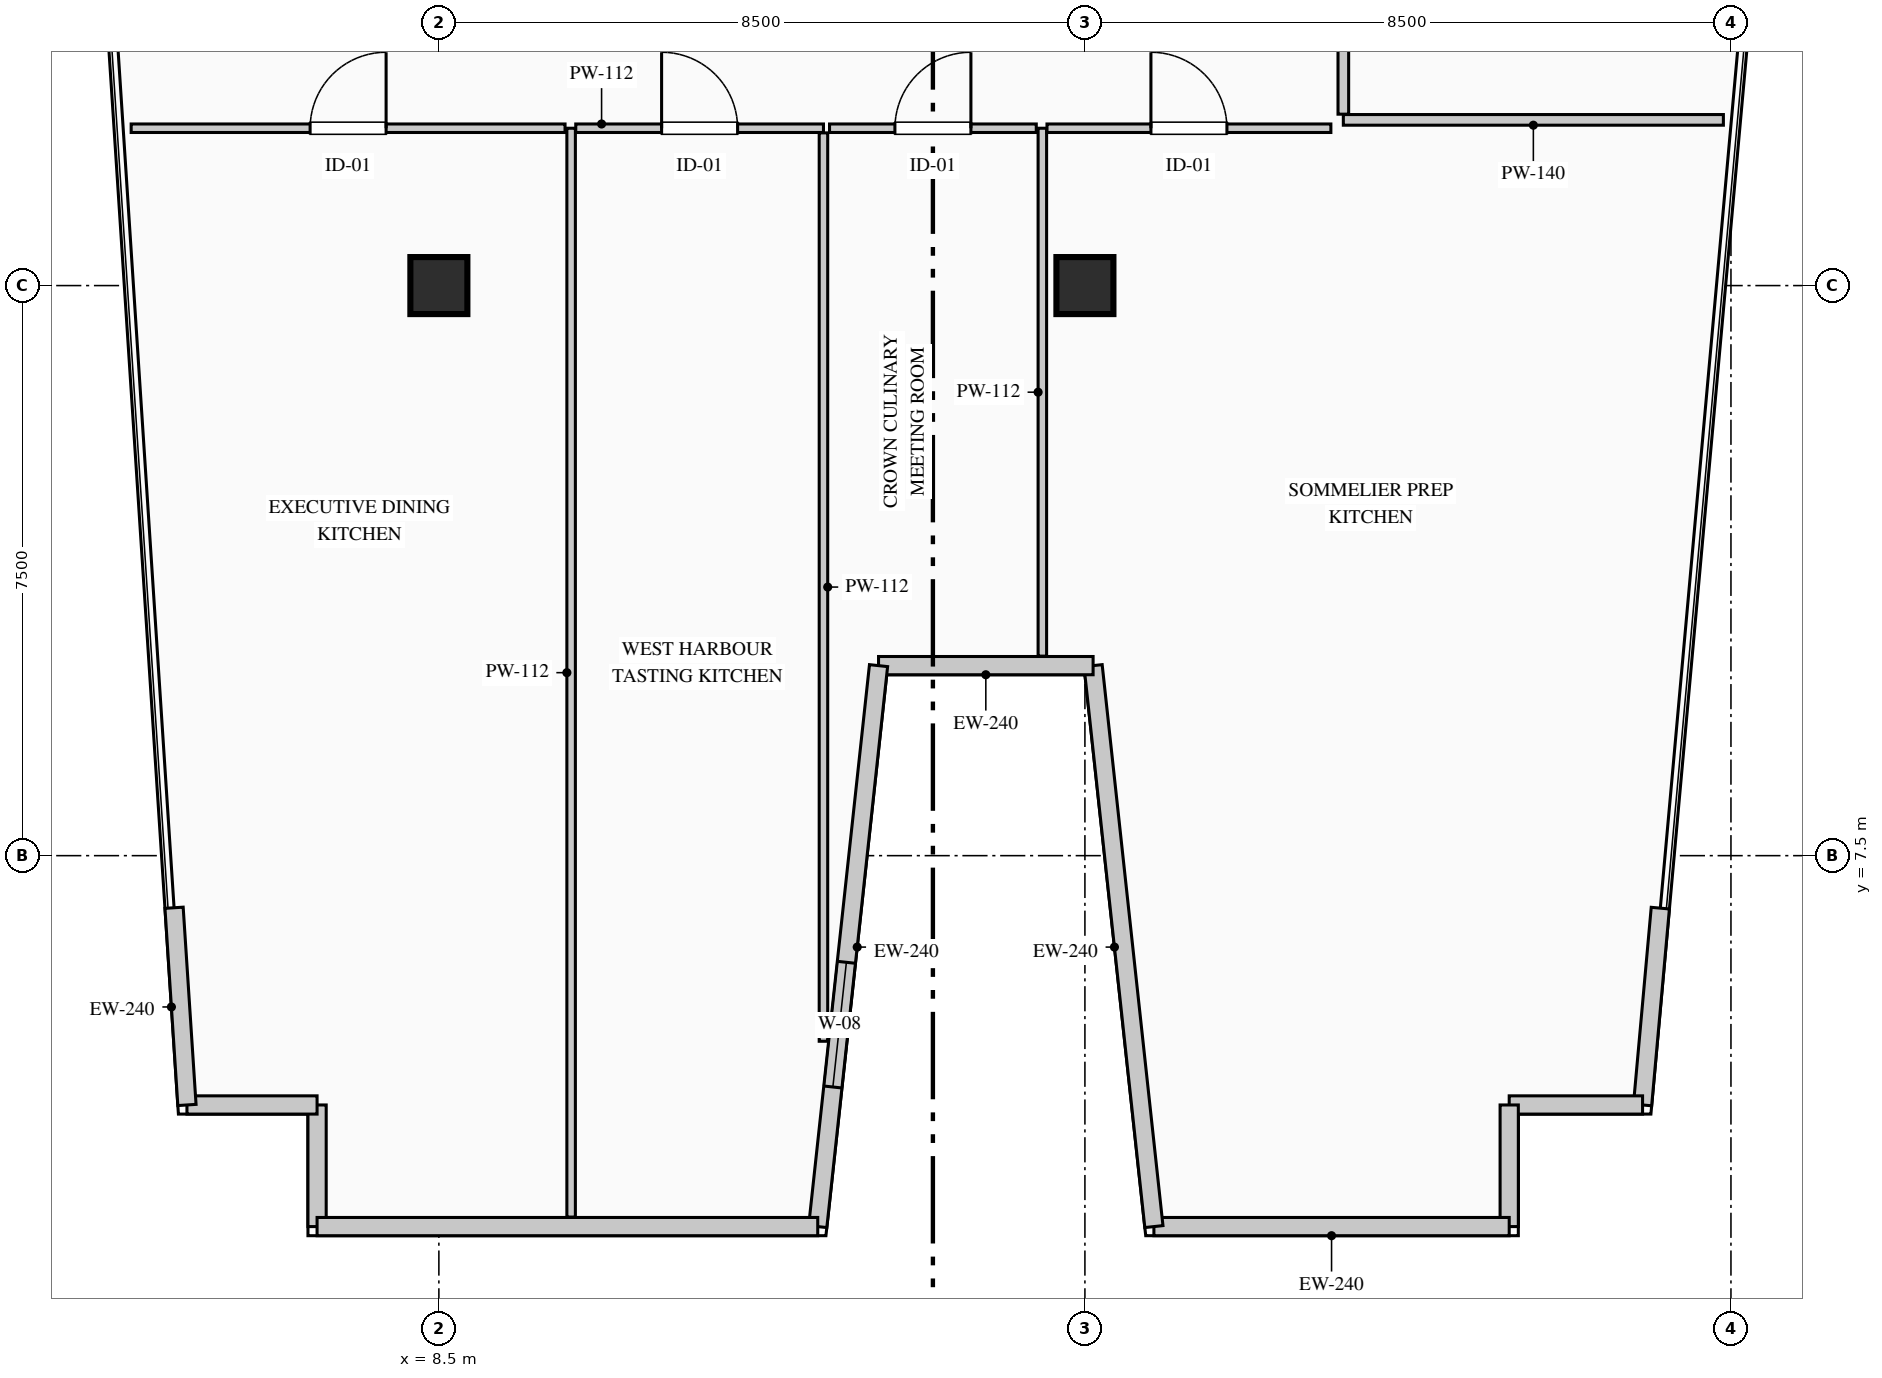
"""IFC4 building model, lengths in metres.
Left out: names, types, materials, properties, quantities, classifications, styles, units other than length and angle.
Written with IfcOpenShell. Run it as: python <this file> out.ifc"""

import sys

from ifc_helpers import new_model, si_unit, direction, frame, frame_2d, origin, origin_2d, place, context, subcontext, project, spatial, rectangle, extrude, element, fill, save


model = new_model("IFC4")
c1 = context("Model", 3, precision=1e-05, world=origin(), true_north=direction((0.0, 1.0)))
c2 = subcontext(c1, "Body", "Model", "MODEL_VIEW")
j1 = project(units=[si_unit("LENGTHUNIT", "METRE"), si_unit("PLANEANGLEUNIT", "RADIAN")], contexts=[c1])
p1 = place(None, origin())
s1 = spatial("IfcSite", under=j1, at=p1, CompositionType="ELEMENT")
p2 = place(p1, origin())
s2 = spatial("IfcBuilding", under=s1, at=p2, CompositionType="ELEMENT")
p3 = place(p2, frame((0.0, 0.0, 304.1)))
s3 = spatial("IfcBuildingStorey", under=s2, at=p3, CompositionType="ELEMENT", Elevation=304.1)
for number, where, z_axis, x_axis in (
    (1, (8.5, 15.0, 0.0), (0.0, 0.0, 1.0), (1.0, 0.0, 0.0)),
    (2, (17.0, 15.0, 0.0), (0.0, 0.0, 1.0), (1.0, 0.0, 0.0)),
):
    element("IfcColumn", number, at=place(p3, frame(where, z_axis=z_axis, x_axis=x_axis)), inside=s3, PredefinedType="COLUMN", context=c2, shape_type="SweptSolid", body=[
        extrude(rectangle(XDim=0.75, YDim=0.75, at=origin_2d()), origin(), (0.0, 0.0, 1.0), 3.95),
    ])
p4 = place(p3, frame((6.897, 2.62, 0.0), z_axis=(0.0, 0.0, 1.0), x_axis=(0.0, 1.0, 0.0)))
e3 = element("IfcWall", 3, at=p4, inside=s3, PredefinedType="STANDARD", context=c2, shape_type="SweptSolid", body=[
    extrude(rectangle(XDim=1.6, YDim=0.24, at=frame_2d((0.8, 0.0))), origin(), (0.0, 0.0, 1.0), 3.7),
])
p5 = place(p3, frame((6.897, 4.22, 0.0), z_axis=(0.0, 0.0, 1.0), x_axis=(-1.0, 0.0, 0.0)))
e4 = element("IfcWall", 4, at=p5, inside=s3, PredefinedType="STANDARD", context=c2, shape_type="SweptSolid", body=[
    extrude(rectangle(XDim=1.712, YDim=0.24, at=frame_2d((0.856, 0.0))), origin(), (0.0, 0.0, 1.0), 3.7),
])
for number, where, z_axis, x_axis in (
    (5, (5.185, 4.22, 0.0), (0.0, 0.0, 1.0), (-0.065, 0.998, 0.0)),
    (6, (24.571, 6.81, 0.0), (0.0, 0.0, 1.0), (-0.09, -0.996, 0.0)),
):
    element("IfcWall", number, at=place(p3, frame(where, z_axis=z_axis, x_axis=x_axis)), inside=s3, PredefinedType="STANDARD", context=c2, shape_type="SweptSolid", body=[
        extrude(rectangle(XDim=2.6, YDim=0.24, at=frame_2d((1.3, 0.0))), origin(), (0.0, 0.0, 1.0), 3.7),
    ])
p6 = place(p3, frame((24.337, 4.22, 0.0), z_axis=(0.0, 0.0, 1.0), x_axis=(-1.0, 0.0, 0.0)))
e7 = element("IfcWall", 7, at=p6, inside=s3, PredefinedType="STANDARD", context=c2, shape_type="SweptSolid", body=[
    extrude(rectangle(XDim=1.755, YDim=0.24, at=frame_2d((0.877, 0.0))), origin(), (0.0, 0.0, 1.0), 3.7),
])
p7 = place(p3, frame((22.583, 4.22, 0.0), z_axis=(0.0, 0.0, 1.0), x_axis=(0.0, -1.0, 0.0)))
e8 = element("IfcWall", 8, at=p7, inside=s3, PredefinedType="STANDARD", context=c2, shape_type="SweptSolid", body=[
    extrude(rectangle(XDim=1.6, YDim=0.24, at=frame_2d((0.8, 0.0))), origin(), (0.0, 0.0, 1.0), 3.7),
])
p8 = place(p3, frame((22.583, 2.62, 0.0), z_axis=(0.0, 0.0, 1.0), x_axis=(-1.0, 0.0, 0.0)))
e9 = element("IfcWall", 9, at=p8, inside=s3, PredefinedType="STANDARD", context=c2, shape_type="SweptSolid", body=[
    extrude(rectangle(XDim=4.675, YDim=0.24, at=frame_2d((2.337, 0.0))), origin(), (0.0, 0.0, 1.0), 3.7),
])
p9 = place(p3, frame((17.908, 2.62, 0.0), z_axis=(0.0, 0.0, 1.0), x_axis=(-0.107777936076, 0.994174992894, 0.0)))
e10 = element("IfcWall", 10, at=p9, inside=s3, PredefinedType="STANDARD", context=c2, shape_type="SweptSolid", body=[
    extrude(rectangle(XDim=7.423, YDim=0.24, at=frame_2d((3.711, 0.0))), origin(), (0.0, 0.0, 1.0), 3.7),
])
p10 = place(p3, frame((17.108, 10.0, 0.0), z_axis=(0.0, 0.0, 1.0), x_axis=(-1.0, 0.0, 0.0)))
e11 = element("IfcWall", 11, at=p10, inside=s3, PredefinedType="STANDARD", context=c2, shape_type="SweptSolid", body=[
    extrude(rectangle(XDim=2.823, YDim=0.24, at=frame_2d((1.411, 0.0))), origin(), (0.0, 0.0, 1.0), 3.7),
])
p11 = place(p3, frame((14.285, 10.0, 0.0), z_axis=(0.0, 0.0, 1.0), x_axis=(-0.107777936076, -0.994174992894, 0.0)))
e12 = element("IfcWall", 12, at=p11, inside=s3, PredefinedType="STANDARD", context=c2, shape_type="SweptSolid", body=[
    extrude(rectangle(XDim=7.423, YDim=0.24, at=frame_2d((3.711, 0.0))), origin(), (0.0, 0.0, 1.0), 3.7),
])
p12 = place(p11, frame((3.926, 0.0, 0.9)))
e13 = element("IfcOpeningElement", 13, at=p12, cuts=e12, PredefinedType="OPENING", context=c2, shape_type="SweptSolid", body=[
    extrude(rectangle(XDim=1.65, YDim=1.95, at=frame_2d((0.825, 0.975))), frame((0.0, 0.13, 0.0), z_axis=(0.0, -1.0, 0.0), x_axis=(1.0, 0.0, 0.0)), (0.0, 0.0, 1.0), 0.26),
])
p13 = place(p3, frame((13.485, 2.62, 0.0), z_axis=(0.0, 0.0, 1.0), x_axis=(-1.0, 0.0, 0.0)))
e14 = element("IfcWall", 14, at=p13, inside=s3, PredefinedType="STANDARD", context=c2, shape_type="SweptSolid", body=[
    extrude(rectangle(XDim=6.587, YDim=0.24, at=frame_2d((3.294, 0.0))), origin(), (0.0, 0.0, 1.0), 3.7),
])
p14 = place(p3, frame((25.4, 17.18, 0.0), z_axis=(0.0, 0.0, 1.0), x_axis=(-1.0, 0.0, 0.0)))
e15 = element("IfcWall", 15, at=p14, inside=s3, PredefinedType="PARTITIONING", context=c2, shape_type="SweptSolid", body=[
    extrude(rectangle(XDim=5.0, YDim=0.14, at=frame_2d((2.5, 0.0))), origin(), (0.0, 0.0, 1.0), 3.7),
])
p15 = place(p3, frame((20.4, 17.255, 0.0), z_axis=(0.0, 0.0, 1.0), x_axis=(0.0, 1.0, 0.0)))
e16 = element("IfcWall", 16, at=p15, inside=s3, PredefinedType="PARTITIONING", context=c2, shape_type="SweptSolid", body=[
    extrude(rectangle(XDim=3.995, YDim=0.14, at=frame_2d((1.998, 0.0))), origin(), (0.0, 0.0, 1.0), 3.7),
])
p16 = place(p15, frame((1.522, 0.0, 0.0)))
e17 = element("IfcOpeningElement", 17, at=p16, cuts=e16, PredefinedType="OPENING", context=c2, shape_type="SweptSolid", body=[
    extrude(rectangle(XDim=0.95, YDim=2.15, at=frame_2d((0.475, 1.075))), frame((0.0, 0.08, 0.0), z_axis=(0.0, -1.0, 0.0), x_axis=(1.0, 0.0, 0.0)), (0.0, 0.0, 1.0), 0.16),
])
p17 = place(p3, frame((10.24, 2.745, 0.0), z_axis=(0.0, 0.0, 1.0), x_axis=(0.0, 1.0, 0.0)))
e18 = element("IfcWall", 18, at=p17, inside=s3, PredefinedType="PARTITIONING", context=c2, shape_type="SweptSolid", body=[
    extrude(rectangle(XDim=14.325, YDim=0.112, at=frame_2d((7.163, 0.0))), origin(), (0.0, 0.0, 1.0), 3.325),
])
p18 = place(p3, frame((10.301, 17.07, 0.0), z_axis=(0.0, 0.0, 1.0), x_axis=(1.0, 0.0, 0.0)))
e19 = element("IfcWall", 19, at=p18, inside=s3, PredefinedType="PARTITIONING", context=c2, shape_type="SweptSolid", body=[
    extrude(rectangle(XDim=3.259, YDim=0.112, at=frame_2d((1.629, 0.0))), origin(), (0.0, 0.0, 1.0), 3.7),
])
p19 = place(p18, frame((1.129, 0.0, 0.0)))
e20 = element("IfcOpeningElement", 20, at=p19, cuts=e19, PredefinedType="OPENING", context=c2, shape_type="SweptSolid", body=[
    extrude(rectangle(XDim=1.0, YDim=2.15, at=frame_2d((0.5, 1.075))), frame((0.0, 0.066, 0.0), z_axis=(0.0, -1.0, 0.0), x_axis=(1.0, 0.0, 0.0)), (0.0, 0.0, 1.0), 0.132),
])
p20 = place(p3, frame((13.56, 17.009, 0.0), z_axis=(0.0, 0.0, 1.0), x_axis=(0.0, -1.0, 0.0)))
e21 = element("IfcWall", 21, at=p20, inside=s3, PredefinedType="PARTITIONING", context=c2, shape_type="SweptSolid", body=[
    extrude(rectangle(XDim=11.951, YDim=0.112, at=frame_2d((5.976, 0.0))), origin(), (0.0, 0.0, 1.0), 3.7),
])
p21 = place(p3, frame((4.451, 17.07, 0.0), z_axis=(0.0, 0.0, 1.0), x_axis=(1.0, 0.0, 0.0)))
e22 = element("IfcWall", 22, at=p21, inside=s3, PredefinedType="PARTITIONING", context=c2, shape_type="SweptSolid", body=[
    extrude(rectangle(XDim=5.708, YDim=0.112, at=frame_2d((2.854, 0.0))), origin(), (0.0, 0.0, 1.0), 3.7),
])
p22 = place(p21, frame((2.354, 0.0, 0.0)))
e23 = element("IfcOpeningElement", 23, at=p22, cuts=e22, PredefinedType="OPENING", context=c2, shape_type="SweptSolid", body=[
    extrude(rectangle(XDim=1.0, YDim=2.15, at=frame_2d((0.5, 1.075))), frame((0.0, 0.066, 0.0), z_axis=(0.0, -1.0, 0.0), x_axis=(1.0, 0.0, 0.0)), (0.0, 0.0, 1.0), 0.132),
])
p23 = place(p3, frame((16.44, 10.125, 0.0), z_axis=(0.0, 0.0, 1.0), x_axis=(0.0, 1.0, 0.0)))
e24 = element("IfcWall", 24, at=p23, inside=s3, PredefinedType="PARTITIONING", context=c2, shape_type="SweptSolid", body=[
    extrude(rectangle(XDim=6.945, YDim=0.112, at=frame_2d((3.473, 0.0))), origin(), (0.0, 0.0, 1.0), 3.7),
])
p24 = place(p3, frame((16.501, 17.07, 0.0), z_axis=(0.0, 0.0, 1.0), x_axis=(1.0, 0.0, 0.0)))
e25 = element("IfcWall", 25, at=p24, inside=s3, PredefinedType="PARTITIONING", context=c2, shape_type="SweptSolid", body=[
    extrude(rectangle(XDim=3.735, YDim=0.112, at=frame_2d((1.868, 0.0))), origin(), (0.0, 0.0, 1.0), 3.7),
])
p25 = place(p24, frame((1.367, 0.0, 0.0)))
e26 = element("IfcOpeningElement", 26, at=p25, cuts=e25, PredefinedType="OPENING", context=c2, shape_type="SweptSolid", body=[
    extrude(rectangle(XDim=1.0, YDim=2.15, at=frame_2d((0.5, 1.075))), frame((0.0, 0.066, 0.0), z_axis=(0.0, -1.0, 0.0), x_axis=(1.0, 0.0, 0.0)), (0.0, 0.0, 1.0), 0.132),
])
p26 = place(p3, frame((13.64, 17.07, 0.0), z_axis=(0.0, 0.0, 1.0), x_axis=(1.0, 0.0, 0.0)))
e27 = element("IfcWall", 27, at=p26, inside=s3, PredefinedType="PARTITIONING", context=c2, shape_type="SweptSolid", body=[
    extrude(rectangle(XDim=2.72, YDim=0.112, at=frame_2d((1.36, 0.0))), origin(), (0.0, 0.0, 1.0), 3.7),
])
p27 = place(p26, frame((0.86, 0.0, 0.0)))
e28 = element("IfcOpeningElement", 28, at=p27, cuts=e27, PredefinedType="OPENING", context=c2, shape_type="SweptSolid", body=[
    extrude(rectangle(XDim=1.0, YDim=2.15, at=frame_2d((0.5, 1.075))), frame((0.0, 0.066, 0.0), z_axis=(0.0, -1.0, 0.0), x_axis=(1.0, 0.0, 0.0)), (0.0, 0.0, 1.0), 0.132),
])
p28 = place(p12, origin())
e29 = element("IfcWindow", 29, at=p28, inside=s3, PartitioningType="SINGLE_PANEL", PredefinedType="WINDOW", context=c2, shape_type="SweptSolid", body=[
    extrude(rectangle(XDim=1.65, YDim=1.95, at=frame_2d((0.825, 0.975))), frame((0.0, 0.03, 0.0), z_axis=(0.0, -1.0, 0.0), x_axis=(1.0, 0.0, 0.0)), (0.0, 0.0, 1.0), 0.06),
])
fill(e13, e29)
p29 = place(p19, origin())
e30 = element("IfcDoor", 30, at=p29, inside=s3, OperationType="SINGLE_SWING_LEFT", PredefinedType="DOOR", context=c2, shape_type="SweptSolid", body=[
    extrude(rectangle(XDim=1.0, YDim=2.15, at=frame_2d((0.5, 1.075))), frame((0.0, 0.025, 0.0), z_axis=(0.0, -1.0, 0.0), x_axis=(1.0, 0.0, 0.0)), (0.0, 0.0, 1.0), 0.05),
])
fill(e20, e30)
p30 = place(p22, origin())
e31 = element("IfcDoor", 31, at=p30, inside=s3, OperationType="SINGLE_SWING_RIGHT", PredefinedType="DOOR", context=c2, shape_type="SweptSolid", body=[
    extrude(rectangle(XDim=1.0, YDim=2.15, at=frame_2d((0.5, 1.075))), frame((0.0, 0.025, 0.0), z_axis=(0.0, -1.0, 0.0), x_axis=(1.0, 0.0, 0.0)), (0.0, 0.0, 1.0), 0.05),
])
fill(e23, e31)
p31 = place(p25, origin())
e32 = element("IfcDoor", 32, at=p31, inside=s3, OperationType="SINGLE_SWING_LEFT", PredefinedType="DOOR", context=c2, shape_type="SweptSolid", body=[
    extrude(rectangle(XDim=1.0, YDim=2.15, at=frame_2d((0.5, 1.075))), frame((0.0, 0.025, 0.0), z_axis=(0.0, -1.0, 0.0), x_axis=(1.0, 0.0, 0.0)), (0.0, 0.0, 1.0), 0.05),
])
fill(e26, e32)
p32 = place(p27, origin())
e33 = element("IfcDoor", 33, at=p32, inside=s3, OperationType="SINGLE_SWING_RIGHT", PredefinedType="DOOR", context=c2, shape_type="SweptSolid", body=[
    extrude(rectangle(XDim=1.0, YDim=2.15, at=frame_2d((0.5, 1.075))), frame((0.0, 0.025, 0.0), z_axis=(0.0, -1.0, 0.0), x_axis=(1.0, 0.0, 0.0)), (0.0, 0.0, 1.0), 0.05),
])
fill(e28, e33)
save(model, sys.argv[1])
